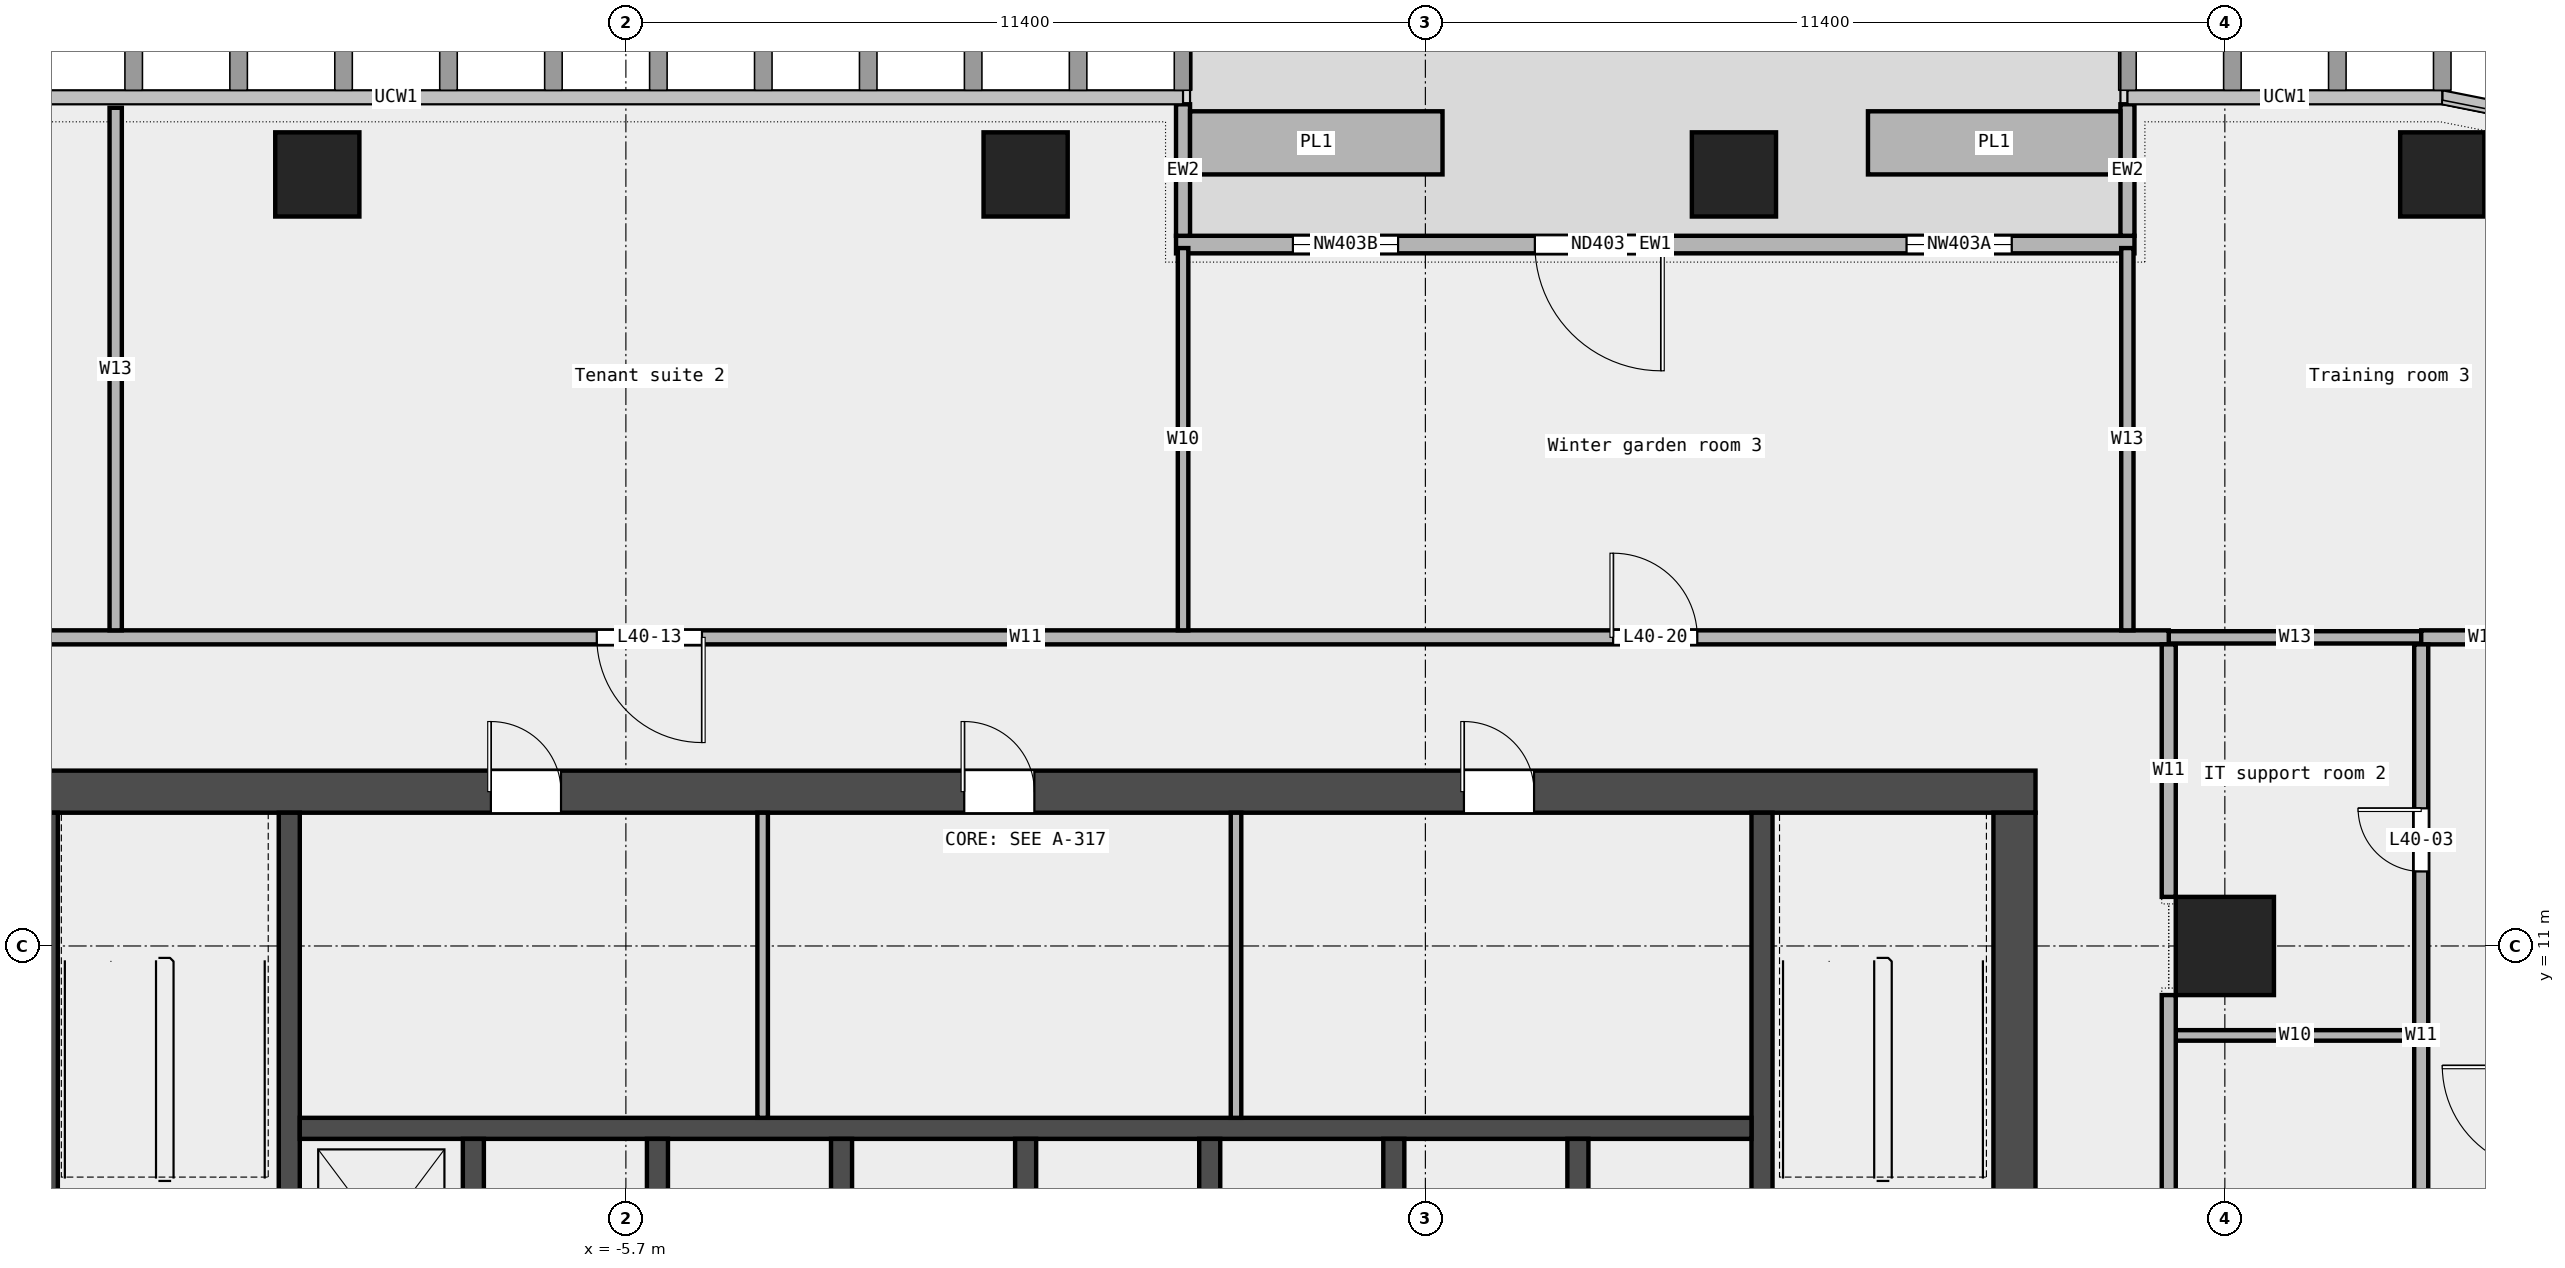
"""IFC4 building model, lengths in metres.
Left out: names, types, materials, properties, quantities, classifications, styles, units other than length and angle.
Written with IfcOpenShell. Run it as: python <this file> out.ifc"""

import sys

from ifc_helpers import new_model, si_unit, direction, frame, frame_2d, origin, origin_2d, place, context, subcontext, project, spatial, rectangle, extrude, element, fill, save


model = new_model("IFC4")
c1 = context("Model", 3, precision=1e-05, world=origin(), true_north=direction((0.0, 1.0)))
c2 = subcontext(c1, "Body", "Model", "MODEL_VIEW")
j1 = project(units=[si_unit("LENGTHUNIT", "METRE"), si_unit("PLANEANGLEUNIT", "RADIAN")], contexts=[c1])
p1 = place(None, origin())
s1 = spatial("IfcSite", under=j1, at=p1, CompositionType="ELEMENT")
p2 = place(p1, origin())
s2 = spatial("IfcBuilding", under=s1, at=p2, CompositionType="ELEMENT")
p3 = place(p2, frame((0.0, 0.0, 193.0)))
s3 = spatial("IfcBuildingStorey", under=s2, at=p3, CompositionType="ELEMENT", Elevation=193.0)
for number, where, z_axis, x_axis in (
    (1, (20.2, 22.0, 0.0), (0.0, 0.0, 1.0), (1.0, 0.0, 0.0)),
    (2, (10.1, 22.0, 0.0), (0.0, 0.0, 1.0), (1.0, 0.0, 0.0)),
    (3, (0.0, 22.0, 0.0), (0.0, 0.0, 1.0), (1.0, 0.0, 0.0)),
    (4, (-10.1, 22.0, 0.0), (0.0, 0.0, 1.0), (1.0, 0.0, 0.0)),
):
    element("IfcColumn", number, at=place(p3, frame(where, z_axis=z_axis, x_axis=x_axis)), inside=s3, PredefinedType="COLUMN", context=c2, shape_type="SweptSolid", body=[
        extrude(rectangle(XDim=1.2, YDim=1.2, at=origin_2d()), origin(), (0.0, 0.0, 1.0), 3.6),
    ])
p4 = place(p3, frame((17.1, 11.0, 0.0), z_axis=(0.0, 0.0, 1.0), x_axis=(1.0, 0.0, 0.0)))
e5 = element("IfcColumn", 5, at=p4, inside=s3, PredefinedType="COLUMN", context=c2, shape_type="SweptSolid", body=[
    extrude(rectangle(XDim=1.4, YDim=1.4, at=origin_2d()), origin(), (0.0, 0.0, 1.0), 3.6),
])
p5 = place(p3, frame((15.811, 21.0, 0.0), z_axis=(0.0, 0.0, 1.0), x_axis=(-1.0, 0.0, 0.0)))
e6 = element("IfcWall", 6, at=p5, inside=s3, PredefinedType="STANDARD", context=c2, shape_type="SweptSolid", body=[
    extrude(rectangle(XDim=13.667, YDim=0.25, at=frame_2d((6.833, 0.0))), origin(), (0.0, 0.0, 1.0), 3.6),
])
p6 = place(p5, frame((1.75, 0.0, 0.45)))
e7 = element("IfcOpeningElement", 7, at=p6, cuts=e6, PredefinedType="OPENING", context=c2, shape_type="SweptSolid", body=[
    extrude(rectangle(XDim=1.5, YDim=2.4, at=frame_2d((0.75, 1.2))), frame((0.0, 0.137, 0.0), z_axis=(0.0, -1.0, 0.0), x_axis=(1.0, 0.0, 0.0)), (0.0, 0.0, 1.0), 0.274),
])
p7 = place(p5, frame((6.75, 0.0, 0.0)))
e8 = element("IfcOpeningElement", 8, at=p7, cuts=e6, PredefinedType="OPENING", context=c2, shape_type="SweptSolid", body=[
    extrude(rectangle(XDim=1.8, YDim=2.4, at=frame_2d((0.9, 1.2))), frame((0.0, 0.137, 0.0), z_axis=(0.0, -1.0, 0.0), x_axis=(1.0, 0.0, 0.0)), (0.0, 0.0, 1.0), 0.274),
])
p8 = place(p5, frame((10.5, 0.0, 0.45)))
e9 = element("IfcOpeningElement", 9, at=p8, cuts=e6, PredefinedType="OPENING", context=c2, shape_type="SweptSolid", body=[
    extrude(rectangle(XDim=1.5, YDim=2.4, at=frame_2d((0.75, 1.2))), frame((0.0, 0.137, 0.0), z_axis=(0.0, -1.0, 0.0), x_axis=(1.0, 0.0, 0.0)), (0.0, 0.0, 1.0), 0.274),
])
for number, where, z_axis, x_axis in (
    (10, (15.711, 23.0, 0.0), (0.0, 0.0, 1.0), (0.0, -1.0, 0.0)),
    (11, (2.244, 23.0, 0.0), (0.0, 0.0, 1.0), (0.0, -1.0, 0.0)),
):
    element("IfcWall", number, at=place(p3, frame(where, z_axis=z_axis, x_axis=x_axis)), inside=s3, PredefinedType="STANDARD", context=c2, shape_type="SweptSolid", body=[
        extrude(rectangle(XDim=1.875, YDim=0.2, at=frame_2d((0.938, 0.0))), origin(), (0.0, 0.0, 1.0), 3.6),
    ])
for number, where, z_axis, x_axis in (
    (12, (15.611, 22.45, 0.0), (0.0, 0.0, 1.0), (-1.0, 0.0, 0.0)),
    (13, (5.944, 22.45, 0.0), (0.0, 0.0, 1.0), (-1.0, 0.0, 0.0)),
):
    element("IfcWall", number, at=place(p3, frame(where, z_axis=z_axis, x_axis=x_axis)), inside=s3, PredefinedType="STANDARD", context=c2, shape_type="SweptSolid", body=[
        extrude(rectangle(XDim=3.6, YDim=0.9, at=frame_2d((1.8, 0.0))), origin(), (0.0, 0.0, 1.0), 0.7),
    ])
p9 = place(p3, frame((16.4, 9.725, 0.0), z_axis=(0.0, 0.0, 1.0), x_axis=(1.0, 0.0, 0.0)))
e14 = element("IfcWall", 14, at=p9, inside=s3, PredefinedType="PARTITIONING", context=c2, shape_type="SweptSolid", body=[
    extrude(rectangle(XDim=3.4, YDim=0.15, at=frame_2d((1.7, 0.0))), origin(), (0.0, 0.0, 1.0), 3.6),
])
p10 = place(p3, frame((16.3, 15.4, 0.0), z_axis=(0.0, 0.0, 1.0), x_axis=(1.0, 0.0, 0.0)))
e15 = element("IfcWall", 15, at=p10, inside=s3, PredefinedType="PARTITIONING", context=c2, shape_type="SweptSolid", body=[
    extrude(rectangle(XDim=3.6, YDim=0.175, at=frame_2d((1.8, 0.0))), origin(), (0.0, 0.0, 1.0), 3.6),
])
p11 = place(p3, frame((-16.3, 15.4, 0.0), z_axis=(0.0, 0.0, 1.0), x_axis=(1.0, 0.0, 0.0)))
e16 = element("IfcWall", 16, at=p11, inside=s3, PredefinedType="PARTITIONING", context=c2, shape_type="SweptSolid", body=[
    extrude(rectangle(XDim=32.6, YDim=0.2, at=frame_2d((16.3, 0.0))), origin(), (0.0, 0.0, 1.0), 3.6),
])
p12 = place(p11, frame((10.185, 0.0, 0.0)))
e17 = element("IfcOpeningElement", 17, at=p12, cuts=e16, PredefinedType="OPENING", context=c2, shape_type="SweptSolid", body=[
    extrude(rectangle(XDim=1.5, YDim=2.1, at=frame_2d((0.75, 1.05))), frame((0.0, 0.112, 0.0), z_axis=(0.0, -1.0, 0.0), x_axis=(1.0, 0.0, 0.0)), (0.0, 0.0, 1.0), 0.224),
])
p13 = place(p11, frame((1.062, 0.0, 0.0)))
e18 = element("IfcOpeningElement", 18, at=p13, cuts=e16, PredefinedType="OPENING", context=c2, shape_type="SweptSolid", body=[
    extrude(rectangle(XDim=1.2, YDim=2.1, at=frame_2d((0.6, 1.05))), frame((0.0, 0.112, 0.0), z_axis=(0.0, -1.0, 0.0), x_axis=(1.0, 0.0, 0.0)), (0.0, 0.0, 1.0), 0.224),
])
p14 = place(p11, frame((24.677, 0.0, 0.0)))
e19 = element("IfcOpeningElement", 19, at=p14, cuts=e16, PredefinedType="OPENING", context=c2, shape_type="SweptSolid", body=[
    extrude(rectangle(XDim=1.2, YDim=2.1, at=frame_2d((0.6, 1.05))), frame((0.0, 0.112, 0.0), z_axis=(0.0, -1.0, 0.0), x_axis=(1.0, 0.0, 0.0)), (0.0, 0.0, 1.0), 0.224),
])
p15 = place(p3, frame((19.9, 15.4, 0.0), z_axis=(0.0, 0.0, 1.0), x_axis=(1.0, 0.0, 0.0)))
e20 = element("IfcWall", 20, at=p15, inside=s3, PredefinedType="PARTITIONING", context=c2, shape_type="SweptSolid", body=[
    extrude(rectangle(XDim=1.8, YDim=0.2, at=frame_2d((0.9, 0.0))), origin(), (0.0, 0.0, 1.0), 3.6),
])
p16 = place(p3, frame((-12.975, 15.5, 0.0), z_axis=(0.0, 0.0, 1.0), x_axis=(0.0, 1.0, 0.0)))
e21 = element("IfcWall", 21, at=p16, inside=s3, PredefinedType="PARTITIONING", context=c2, shape_type="SweptSolid", body=[
    extrude(rectangle(XDim=7.45, YDim=0.175, at=frame_2d((3.725, 0.0))), origin(), (0.0, 0.0, 1.0), 3.6),
])
p17 = place(p3, frame((2.245, 15.5, 0.0), z_axis=(0.0, 0.0, 1.0), x_axis=(0.0, 1.0, 0.0)))
e22 = element("IfcWall", 22, at=p17, inside=s3, PredefinedType="PARTITIONING", context=c2, shape_type="SweptSolid", body=[
    extrude(rectangle(XDim=5.45, YDim=0.15, at=frame_2d((2.725, 0.0))), origin(), (0.0, 0.0, 1.0), 3.6),
])
p18 = place(p3, frame((15.71, 15.5, 0.0), z_axis=(0.0, 0.0, 1.0), x_axis=(0.0, 1.0, 0.0)))
e23 = element("IfcWall", 23, at=p18, inside=s3, PredefinedType="PARTITIONING", context=c2, shape_type="SweptSolid", body=[
    extrude(rectangle(XDim=5.45, YDim=0.175, at=frame_2d((2.725, 0.0))), origin(), (0.0, 0.0, 1.0), 3.6),
])
p19 = place(p3, frame((16.3, 4.15, 0.0), z_axis=(0.0, 0.0, 1.0), x_axis=(0.0, 1.0, 0.0)))
e24 = element("IfcWall", 24, at=p19, inside=s3, PredefinedType="PARTITIONING", context=c2, shape_type="SweptSolid", body=[
    extrude(rectangle(XDim=6.15, YDim=0.2, at=frame_2d((3.075, 0.0))), origin(), (0.0, 0.0, 1.0), 3.6),
])
p20 = place(p3, frame((16.3, 11.7, 0.0), z_axis=(0.0, 0.0, 1.0), x_axis=(0.0, 1.0, 0.0)))
e25 = element("IfcWall", 25, at=p20, inside=s3, PredefinedType="PARTITIONING", context=c2, shape_type="SweptSolid", body=[
    extrude(rectangle(XDim=3.6, YDim=0.2, at=frame_2d((1.8, 0.0))), origin(), (0.0, 0.0, 1.0), 3.6),
])
p21 = place(p3, frame((19.9, 4.15, 0.0), z_axis=(0.0, 0.0, 1.0), x_axis=(0.0, 1.0, 0.0)))
e26 = element("IfcWall", 26, at=p21, inside=s3, PredefinedType="PARTITIONING", context=c2, shape_type="SweptSolid", body=[
    extrude(rectangle(XDim=11.15, YDim=0.2, at=frame_2d((5.575, 0.0))), origin(), (0.0, 0.0, 1.0), 3.6),
])
p22 = place(p21, frame((7.913, 0.0, 0.0)))
e27 = element("IfcOpeningElement", 27, at=p22, cuts=e26, PredefinedType="OPENING", context=c2, shape_type="SweptSolid", body=[
    extrude(rectangle(XDim=0.9, YDim=2.1, at=frame_2d((0.45, 1.05))), frame((0.0, 0.112, 0.0), z_axis=(0.0, -1.0, 0.0), x_axis=(1.0, 0.0, 0.0)), (0.0, 0.0, 1.0), 0.224),
])
p23 = place(p21, frame((2.288, 0.0, 0.0)))
e28 = element("IfcOpeningElement", 28, at=p23, cuts=e26, PredefinedType="OPENING", context=c2, shape_type="SweptSolid", body=[
    extrude(rectangle(XDim=1.0, YDim=2.1, at=frame_2d((0.5, 1.05))), frame((0.0, 0.112, 0.0), z_axis=(0.0, -1.0, 0.0), x_axis=(1.0, 0.0, 0.0)), (0.0, 0.0, 1.0), 0.224),
])
p24 = place(p3, frame((-14.4, 13.2, 0.0), z_axis=(0.0, 0.0, 1.0), x_axis=(1.0, 0.0, 0.0)))
e29 = element("IfcWall", 29, at=p24, inside=s3, PredefinedType="SHEAR", context=c2, shape_type="SweptSolid", body=[
    extrude(rectangle(XDim=28.8, YDim=0.6, at=frame_2d((14.4, 0.0))), origin(), (0.0, 0.0, 1.0), 3.7),
])
p25 = place(p24, frame((6.775, 0.0, 0.0)))
e30 = element("IfcOpeningElement", 30, at=p25, cuts=e29, PredefinedType="OPENING", context=c2, shape_type="SweptSolid", body=[
    extrude(rectangle(XDim=1.0, YDim=2.1, at=frame_2d((0.5, 1.05))), frame((0.0, 0.312, 0.0), z_axis=(0.0, -1.0, 0.0), x_axis=(1.0, 0.0, 0.0)), (0.0, 0.0, 1.0), 0.624),
])
p26 = place(p24, frame((13.525, 0.0, 0.0)))
e31 = element("IfcOpeningElement", 31, at=p26, cuts=e29, PredefinedType="OPENING", context=c2, shape_type="SweptSolid", body=[
    extrude(rectangle(XDim=1.0, YDim=2.1, at=frame_2d((0.5, 1.05))), frame((0.0, 0.312, 0.0), z_axis=(0.0, -1.0, 0.0), x_axis=(1.0, 0.0, 0.0)), (0.0, 0.0, 1.0), 0.624),
])
p27 = place(p24, frame((20.65, 0.0, 0.0)))
e32 = element("IfcOpeningElement", 32, at=p27, cuts=e29, PredefinedType="OPENING", context=c2, shape_type="SweptSolid", body=[
    extrude(rectangle(XDim=1.0, YDim=2.1, at=frame_2d((0.5, 1.05))), frame((0.0, 0.312, 0.0), z_axis=(0.0, -1.0, 0.0), x_axis=(1.0, 0.0, 0.0)), (0.0, 0.0, 1.0), 0.624),
])
p28 = place(p3, frame((-14.1, -6.6, 0.0), z_axis=(0.0, 0.0, 1.0), x_axis=(0.0, 1.0, 0.0)))
e33 = element("IfcWall", 33, at=p28, inside=s3, PredefinedType="SHEAR", context=c2, shape_type="SweptSolid", body=[
    extrude(rectangle(XDim=19.5, YDim=0.6, at=frame_2d((9.75, 0.0))), origin(), (0.0, 0.0, 1.0), 3.7),
])
p29 = place(p28, frame((9.3, 0.0, 0.0)))
e34 = element("IfcOpeningElement", 34, at=p29, cuts=e33, PredefinedType="OPENING", context=c2, shape_type="SweptSolid", body=[
    extrude(rectangle(XDim=1.8, YDim=2.1, at=frame_2d((0.9, 1.05))), frame((0.0, 0.312, 0.0), z_axis=(0.0, -1.0, 0.0), x_axis=(1.0, 0.0, 0.0)), (0.0, 0.0, 1.0), 0.624),
])
p30 = place(p3, frame((14.1, -6.6, 0.0), z_axis=(0.0, 0.0, 1.0), x_axis=(0.0, 1.0, 0.0)))
e35 = element("IfcWall", 35, at=p30, inside=s3, PredefinedType="SHEAR", context=c2, shape_type="SweptSolid", body=[
    extrude(rectangle(XDim=19.5, YDim=0.6, at=frame_2d((9.75, 0.0))), origin(), (0.0, 0.0, 1.0), 3.7),
])
p31 = place(p30, frame((9.3, 0.0, 0.0)))
e36 = element("IfcOpeningElement", 36, at=p31, cuts=e35, PredefinedType="OPENING", context=c2, shape_type="SweptSolid", body=[
    extrude(rectangle(XDim=1.8, YDim=2.1, at=frame_2d((0.9, 1.05))), frame((0.0, 0.312, 0.0), z_axis=(0.0, -1.0, 0.0), x_axis=(1.0, 0.0, 0.0)), (0.0, 0.0, 1.0), 0.624),
])
for number, where, z_axis, x_axis in (
    (37, (-10.5, 5.25, 0.0), (0.0, 0.0, 1.0), (0.0, 1.0, 0.0)),
    (38, (10.5, 5.25, 0.0), (0.0, 0.0, 1.0), (0.0, 1.0, 0.0)),
):
    element("IfcWall", number, at=place(p3, frame(where, z_axis=z_axis, x_axis=x_axis)), inside=s3, PredefinedType="SHEAR", context=c2, shape_type="SweptSolid", body=[
        extrude(rectangle(XDim=7.65, YDim=0.3, at=frame_2d((3.825, 0.0))), origin(), (0.0, 0.0, 1.0), 3.7),
    ])
p32 = place(p3, frame((-10.35, 8.4, 0.0), z_axis=(0.0, 0.0, 1.0), x_axis=(1.0, 0.0, 0.0)))
e39 = element("IfcWall", 39, at=p32, inside=s3, PredefinedType="SOLIDWALL", context=c2, shape_type="SweptSolid", body=[
    extrude(rectangle(XDim=20.7, YDim=0.3, at=frame_2d((10.35, 0.0))), origin(), (0.0, 0.0, 1.0), 3.7),
])
for number, where, z_axis, x_axis in (
    (40, (-7.875, 5.55, 0.0), (0.0, 0.0, 1.0), (0.0, 1.0, 0.0)),
    (41, (-5.25, 5.55, 0.0), (0.0, 0.0, 1.0), (0.0, 1.0, 0.0)),
    (42, (-2.625, 5.55, 0.0), (0.0, 0.0, 1.0), (0.0, 1.0, 0.0)),
    (43, (0.0, 5.55, 0.0), (0.0, 0.0, 1.0), (0.0, 1.0, 0.0)),
    (44, (2.625, 5.55, 0.0), (0.0, 0.0, 1.0), (0.0, 1.0, 0.0)),
    (45, (5.25, 5.55, 0.0), (0.0, 0.0, 1.0), (0.0, 1.0, 0.0)),
    (46, (7.875, 5.55, 0.0), (0.0, 0.0, 1.0), (0.0, 1.0, 0.0)),
):
    element("IfcWall", number, at=place(p3, frame(where, z_axis=z_axis, x_axis=x_axis)), inside=s3, PredefinedType="SOLIDWALL", context=c2, shape_type="SweptSolid", body=[
        extrude(rectangle(XDim=2.7, YDim=0.3, at=frame_2d((1.35, 0.0))), origin(), (0.0, 0.0, 1.0), 3.7),
    ])
for number, where, z_axis, x_axis in (
    (47, (-3.75, 8.55, 0.0), (0.0, 0.0, 1.0), (0.0, 1.0, 0.0)),
    (48, (3.0, 8.55, 0.0), (0.0, 0.0, 1.0), (0.0, 1.0, 0.0)),
):
    element("IfcWall", number, at=place(p3, frame(where, z_axis=z_axis, x_axis=x_axis)), inside=s3, PredefinedType="PARTITIONING", context=c2, shape_type="SweptSolid", body=[
        extrude(rectangle(XDim=4.35, YDim=0.15, at=frame_2d((2.175, 0.0))), origin(), (0.0, 0.0, 1.0), 3.7),
    ])
p33 = place(p6, origin())
e49 = element("IfcWindow", 49, at=p33, inside=s3, PartitioningType="SINGLE_PANEL", PredefinedType="WINDOW", context=c2, shape_type="SweptSolid", body=[
    extrude(rectangle(XDim=1.5, YDim=2.4, at=frame_2d((0.75, 1.2))), frame((0.0, 0.03, 0.0), z_axis=(0.0, -1.0, 0.0), x_axis=(1.0, 0.0, 0.0)), (0.0, 0.0, 1.0), 0.06),
])
fill(e7, e49)
p34 = place(p7, origin())
e50 = element("IfcDoor", 50, at=p34, inside=s3, OperationType="DOUBLE_DOOR_SINGLE_SWING", PredefinedType="DOOR", context=c2, shape_type="SweptSolid", body=[
    extrude(rectangle(XDim=1.8, YDim=2.4, at=frame_2d((0.9, 1.2))), frame((0.0, 0.025, 0.0), z_axis=(0.0, -1.0, 0.0), x_axis=(1.0, 0.0, 0.0)), (0.0, 0.0, 1.0), 0.05),
])
fill(e8, e50)
p35 = place(p8, origin())
e51 = element("IfcWindow", 51, at=p35, inside=s3, PartitioningType="SINGLE_PANEL", PredefinedType="WINDOW", context=c2, shape_type="SweptSolid", body=[
    extrude(rectangle(XDim=1.5, YDim=2.4, at=frame_2d((0.75, 1.2))), frame((0.0, 0.03, 0.0), z_axis=(0.0, -1.0, 0.0), x_axis=(1.0, 0.0, 0.0)), (0.0, 0.0, 1.0), 0.06),
])
fill(e9, e51)
p36 = place(p22, origin())
e52 = element("IfcDoor", 52, at=p36, inside=s3, OperationType="SINGLE_SWING_RIGHT", PredefinedType="DOOR", context=c2, shape_type="SweptSolid", body=[
    extrude(rectangle(XDim=0.9, YDim=2.1, at=frame_2d((0.45, 1.05))), frame((0.0, 0.025, 0.0), z_axis=(0.0, -1.0, 0.0), x_axis=(1.0, 0.0, 0.0)), (0.0, 0.0, 1.0), 0.05),
])
fill(e27, e52)
p37 = place(p12, origin())
e53 = element("IfcDoor", 53, at=p37, inside=s3, OperationType="DOUBLE_DOOR_SINGLE_SWING", PredefinedType="DOOR", context=c2, shape_type="SweptSolid", body=[
    extrude(rectangle(XDim=1.5, YDim=2.1, at=frame_2d((0.75, 1.05))), frame((0.0, 0.025, 0.0), z_axis=(0.0, -1.0, 0.0), x_axis=(1.0, 0.0, 0.0)), (0.0, 0.0, 1.0), 0.05),
])
fill(e17, e53)
p38 = place(p14, origin())
e54 = element("IfcDoor", 54, at=p38, inside=s3, OperationType="SINGLE_SWING_LEFT", PredefinedType="DOOR", context=c2, shape_type="SweptSolid", body=[
    extrude(rectangle(XDim=1.2, YDim=2.1, at=frame_2d((0.6, 1.05))), frame((0.0, 0.025, 0.0), z_axis=(0.0, -1.0, 0.0), x_axis=(1.0, 0.0, 0.0)), (0.0, 0.0, 1.0), 0.05),
])
fill(e19, e54)
p39 = place(p25, origin())
e55 = element("IfcDoor", 55, at=p39, inside=s3, OperationType="SINGLE_SWING_LEFT", PredefinedType="DOOR", context=c2, shape_type="SweptSolid", body=[
    extrude(rectangle(XDim=1.0, YDim=2.1, at=frame_2d((0.5, 1.05))), frame((0.0, 0.025, 0.0), z_axis=(0.0, -1.0, 0.0), x_axis=(1.0, 0.0, 0.0)), (0.0, 0.0, 1.0), 0.05),
])
fill(e30, e55)
p40 = place(p26, origin())
e56 = element("IfcDoor", 56, at=p40, inside=s3, OperationType="SINGLE_SWING_LEFT", PredefinedType="DOOR", context=c2, shape_type="SweptSolid", body=[
    extrude(rectangle(XDim=1.0, YDim=2.1, at=frame_2d((0.5, 1.05))), frame((0.0, 0.025, 0.0), z_axis=(0.0, -1.0, 0.0), x_axis=(1.0, 0.0, 0.0)), (0.0, 0.0, 1.0), 0.05),
])
fill(e31, e56)
p41 = place(p27, origin())
e57 = element("IfcDoor", 57, at=p41, inside=s3, OperationType="SINGLE_SWING_LEFT", PredefinedType="DOOR", context=c2, shape_type="SweptSolid", body=[
    extrude(rectangle(XDim=1.0, YDim=2.1, at=frame_2d((0.5, 1.05))), frame((0.0, 0.025, 0.0), z_axis=(0.0, -1.0, 0.0), x_axis=(1.0, 0.0, 0.0)), (0.0, 0.0, 1.0), 0.05),
])
fill(e32, e57)
save(model, sys.argv[1])
